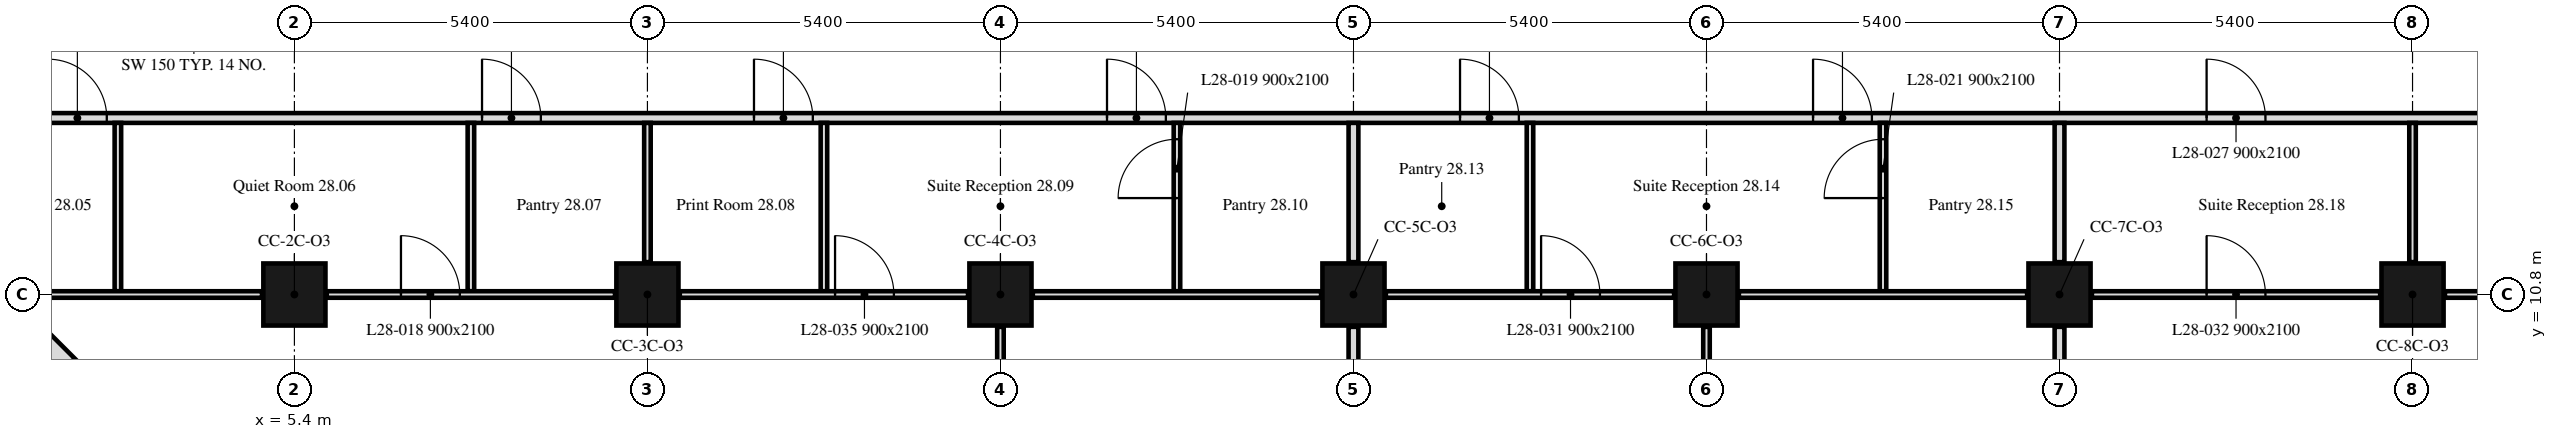
"""IFC4 building model, lengths in metres.
Left out: names, types, materials, properties, quantities, classifications, styles, units other than length and angle.
Written with IfcOpenShell. Run it as: python <this file> out.ifc"""

import sys

from ifc_helpers import new_model, si_unit, direction, frame, frame_2d, origin, origin_2d, place, context, subcontext, project, spatial, rectangle, extrude, element, fill, save


model = new_model("IFC4")
c1 = context("Model", 3, precision=1e-05, world=origin(), true_north=direction((0.0, 1.0)))
c2 = subcontext(c1, "Body", "Model", "MODEL_VIEW")
j1 = project(units=[si_unit("LENGTHUNIT", "METRE"), si_unit("PLANEANGLEUNIT", "RADIAN")], contexts=[c1])
p1 = place(None, origin())
s1 = spatial("IfcSite", under=j1, at=p1, CompositionType="ELEMENT")
p2 = place(p1, origin())
s2 = spatial("IfcBuilding", under=s1, at=p2, CompositionType="ELEMENT")
p3 = place(p2, frame((0.0, 0.0, 118.2)))
s3 = spatial("IfcBuildingStorey", under=s2, at=p3, CompositionType="ELEMENT", Elevation=118.2)
for number, where, z_axis, x_axis in (
    (1, (5.4, 10.8, 0.0), (0.0, 0.0, 1.0), (1.0, 0.0, 0.0)),
    (2, (10.8, 10.8, 0.0), (0.0, 0.0, 1.0), (1.0, 0.0, 0.0)),
    (3, (16.2, 10.8, 0.0), (0.0, 0.0, 1.0), (1.0, 0.0, 0.0)),
    (4, (21.6, 10.8, 0.0), (0.0, 0.0, 1.0), (1.0, 0.0, 0.0)),
    (5, (27.0, 10.8, 0.0), (0.0, 0.0, 1.0), (1.0, 0.0, 0.0)),
    (6, (32.4, 10.8, 0.0), (0.0, 0.0, 1.0), (1.0, 0.0, 0.0)),
    (7, (37.8, 10.8, 0.0), (0.0, 0.0, 1.0), (1.0, 0.0, 0.0)),
):
    element("IfcColumn", number, at=place(p3, frame(where, z_axis=z_axis, x_axis=x_axis)), inside=s3, PredefinedType="COLUMN", context=c2, shape_type="SweptSolid", body=[
        extrude(rectangle(XDim=0.95, YDim=0.95, at=origin_2d()), origin(), (0.0, 0.0, 1.0), 3.5),
    ])
p4 = place(p3, frame((37.65, 6.099, 0.0), z_axis=(0.0, 0.0, 1.0), x_axis=(0.707106781187, 0.707106781187, 0.0)))
e8 = element("IfcWall", 8, at=p4, inside=s3, PredefinedType="SOLIDWALL", context=c2, shape_type="SweptSolid", body=[
    extrude(rectangle(XDim=6.86, YDim=0.3, at=frame_2d((3.43, 0.0))), origin(), (0.0, 0.0, 1.0), 3.5),
])
p5 = place(p4, frame((1.73, 0.0, 0.9)))
e9 = element("IfcOpeningElement", 9, at=p5, cuts=e8, PredefinedType="OPENING", context=c2, shape_type="SweptSolid", body=[
    extrude(rectangle(XDim=3.4, YDim=1.7, at=frame_2d((1.7, 0.85))), frame((0.0, 0.16, 0.0), z_axis=(0.0, -1.0, 0.0), x_axis=(1.0, 0.0, 0.0)), (0.0, 0.0, 1.0), 0.32),
])
p6 = place(p3, frame((0.699, 10.949, 0.0), z_axis=(0.0, 0.0, 1.0), x_axis=(0.707106781187, -0.707106781187, 0.0)))
e10 = element("IfcWall", 10, at=p6, inside=s3, PredefinedType="SOLIDWALL", context=c2, shape_type="SweptSolid", body=[
    extrude(rectangle(XDim=6.86, YDim=0.3, at=frame_2d((3.43, 0.0))), origin(), (0.0, 0.0, 1.0), 3.5),
])
p7 = place(p6, frame((1.73, 0.0, 0.9)))
e11 = element("IfcOpeningElement", 11, at=p7, cuts=e10, PredefinedType="OPENING", context=c2, shape_type="SweptSolid", body=[
    extrude(rectangle(XDim=3.4, YDim=1.7, at=frame_2d((1.7, 0.85))), frame((0.0, 0.16, 0.0), z_axis=(0.0, -1.0, 0.0), x_axis=(1.0, 0.0, 0.0)), (0.0, 0.0, 1.0), 0.32),
])
p8 = place(p3, frame((0.751, 13.5, 0.0), z_axis=(0.0, 0.0, 1.0), x_axis=(1.0, 0.0, 0.0)))
e12 = element("IfcWall", 12, at=p8, inside=s3, PredefinedType="PARTITIONING", context=c2, shape_type="SweptSolid", body=[
    extrude(rectangle(XDim=41.698, YDim=0.15, at=frame_2d((20.849, 0.0))), origin(), (0.0, 0.0, 1.0), 3.5),
])
p9 = place(p8, frame((0.879, 0.0, 0.0)))
e13 = element("IfcOpeningElement", 13, at=p9, cuts=e12, PredefinedType="OPENING", context=c2, shape_type="SweptSolid", body=[
    extrude(rectangle(XDim=0.9, YDim=2.1, at=frame_2d((0.45, 1.05))), frame((0.0, 0.075, 0.0), z_axis=(0.0, -1.0, 0.0), x_axis=(1.0, 0.0, 0.0)), (0.0, 0.0, 1.0), 0.15),
])
p10 = place(p8, frame((7.519, 0.0, 0.0)))
e14 = element("IfcOpeningElement", 14, at=p10, cuts=e12, PredefinedType="OPENING", context=c2, shape_type="SweptSolid", body=[
    extrude(rectangle(XDim=0.9, YDim=2.1, at=frame_2d((0.45, 1.05))), frame((0.0, 0.075, 0.0), z_axis=(0.0, -1.0, 0.0), x_axis=(1.0, 0.0, 0.0)), (0.0, 0.0, 1.0), 0.15),
])
p11 = place(p8, frame((11.679, 0.0, 0.0)))
e15 = element("IfcOpeningElement", 15, at=p11, cuts=e12, PredefinedType="OPENING", context=c2, shape_type="SweptSolid", body=[
    extrude(rectangle(XDim=0.9, YDim=2.1, at=frame_2d((0.45, 1.05))), frame((0.0, 0.075, 0.0), z_axis=(0.0, -1.0, 0.0), x_axis=(1.0, 0.0, 0.0)), (0.0, 0.0, 1.0), 0.15),
])
p12 = place(p8, frame((22.479, 0.0, 0.0)))
e16 = element("IfcOpeningElement", 16, at=p12, cuts=e12, PredefinedType="OPENING", context=c2, shape_type="SweptSolid", body=[
    extrude(rectangle(XDim=0.9, YDim=2.1, at=frame_2d((0.45, 1.05))), frame((0.0, 0.075, 0.0), z_axis=(0.0, -1.0, 0.0), x_axis=(1.0, 0.0, 0.0)), (0.0, 0.0, 1.0), 0.15),
])
p13 = place(p8, frame((33.899, 0.0, 0.0)))
e17 = element("IfcOpeningElement", 17, at=p13, cuts=e12, PredefinedType="OPENING", context=c2, shape_type="SweptSolid", body=[
    extrude(rectangle(XDim=0.9, YDim=2.1, at=frame_2d((0.45, 1.05))), frame((0.0, 0.075, 0.0), z_axis=(0.0, -1.0, 0.0), x_axis=(1.0, 0.0, 0.0)), (0.0, 0.0, 1.0), 0.15),
])
p14 = place(p8, frame((17.079, 0.0, 0.0)))
e18 = element("IfcOpeningElement", 18, at=p14, cuts=e12, PredefinedType="OPENING", context=c2, shape_type="SweptSolid", body=[
    extrude(rectangle(XDim=0.9, YDim=2.1, at=frame_2d((0.45, 1.05))), frame((0.0, 0.075, 0.0), z_axis=(0.0, -1.0, 0.0), x_axis=(1.0, 0.0, 0.0)), (0.0, 0.0, 1.0), 0.15),
])
p15 = place(p8, frame((27.879, 0.0, 0.0)))
e19 = element("IfcOpeningElement", 19, at=p15, cuts=e12, PredefinedType="OPENING", context=c2, shape_type="SweptSolid", body=[
    extrude(rectangle(XDim=0.9, YDim=2.1, at=frame_2d((0.45, 1.05))), frame((0.0, 0.075, 0.0), z_axis=(0.0, -1.0, 0.0), x_axis=(1.0, 0.0, 0.0)), (0.0, 0.0, 1.0), 0.15),
])
p16 = place(p3, frame((2.7, 10.85, 0.0), z_axis=(0.0, 0.0, 1.0), x_axis=(0.0, 1.0, 0.0)))
e20 = element("IfcWall", 20, at=p16, inside=s3, PredefinedType="PARTITIONING", context=c2, shape_type="SweptSolid", body=[
    extrude(rectangle(XDim=2.575, YDim=0.1, at=frame_2d((1.288, 0.0))), origin(), (0.0, 0.0, 1.0), 3.5),
])
p17 = place(p3, frame((1.112, 10.8, 0.0), z_axis=(0.0, 0.0, 1.0), x_axis=(1.0, 0.0, 0.0)))
e21 = element("IfcWall", 21, at=p17, inside=s3, PredefinedType="PARTITIONING", context=c2, shape_type="SweptSolid", body=[
    extrude(rectangle(XDim=3.793, YDim=0.1, at=frame_2d((1.896, 0.0))), origin(), (0.0, 0.0, 1.0), 3.5),
])
p18 = place(p3, frame((8.1, 10.85, 0.0), z_axis=(0.0, 0.0, 1.0), x_axis=(0.0, 1.0, 0.0)))
e22 = element("IfcWall", 22, at=p18, inside=s3, PredefinedType="PARTITIONING", context=c2, shape_type="SweptSolid", body=[
    extrude(rectangle(XDim=2.575, YDim=0.1, at=frame_2d((1.288, 0.0))), origin(), (0.0, 0.0, 1.0), 3.5),
])
p19 = place(p3, frame((5.895, 10.8, 0.0), z_axis=(0.0, 0.0, 1.0), x_axis=(1.0, 0.0, 0.0)))
e23 = element("IfcWall", 23, at=p19, inside=s3, PredefinedType="PARTITIONING", context=c2, shape_type="SweptSolid", body=[
    extrude(rectangle(XDim=4.41, YDim=0.1, at=frame_2d((2.205, 0.0))), origin(), (0.0, 0.0, 1.0), 3.5),
])
p20 = place(p19, frame((1.135, 0.0, 0.0)))
e24 = element("IfcOpeningElement", 24, at=p20, cuts=e23, PredefinedType="OPENING", context=c2, shape_type="SweptSolid", body=[
    extrude(rectangle(XDim=0.9, YDim=2.1, at=frame_2d((0.45, 1.05))), frame((0.0, 0.05, 0.0), z_axis=(0.0, -1.0, 0.0), x_axis=(1.0, 0.0, 0.0)), (0.0, 0.0, 1.0), 0.1),
])
p21 = place(p3, frame((10.8, 11.295, 0.0), z_axis=(0.0, 0.0, 1.0), x_axis=(0.0, 1.0, 0.0)))
e25 = element("IfcWall", 25, at=p21, inside=s3, PredefinedType="PARTITIONING", context=c2, shape_type="SweptSolid", body=[
    extrude(rectangle(XDim=2.13, YDim=0.1, at=frame_2d((1.065, 0.0))), origin(), (0.0, 0.0, 1.0), 3.5),
])
p22 = place(p3, frame((13.5, 10.85, 0.0), z_axis=(0.0, 0.0, 1.0), x_axis=(0.0, 1.0, 0.0)))
e26 = element("IfcWall", 26, at=p22, inside=s3, PredefinedType="PARTITIONING", context=c2, shape_type="SweptSolid", body=[
    extrude(rectangle(XDim=2.575, YDim=0.1, at=frame_2d((1.288, 0.0))), origin(), (0.0, 0.0, 1.0), 3.5),
])
p23 = place(p3, frame((11.295, 10.8, 0.0), z_axis=(0.0, 0.0, 1.0), x_axis=(1.0, 0.0, 0.0)))
e27 = element("IfcWall", 27, at=p23, inside=s3, PredefinedType="PARTITIONING", context=c2, shape_type="SweptSolid", body=[
    extrude(rectangle(XDim=4.41, YDim=0.1, at=frame_2d((2.205, 0.0))), origin(), (0.0, 0.0, 1.0), 3.5),
])
p24 = place(p23, frame((2.375, 0.0, 0.0)))
e28 = element("IfcOpeningElement", 28, at=p24, cuts=e27, PredefinedType="OPENING", context=c2, shape_type="SweptSolid", body=[
    extrude(rectangle(XDim=0.9, YDim=2.1, at=frame_2d((0.45, 1.05))), frame((0.0, 0.05, 0.0), z_axis=(0.0, -1.0, 0.0), x_axis=(1.0, 0.0, 0.0)), (0.0, 0.0, 1.0), 0.1),
])
p25 = place(p3, frame((18.9, 10.85, 0.0), z_axis=(0.0, 0.0, 1.0), x_axis=(0.0, 1.0, 0.0)))
e29 = element("IfcWall", 29, at=p25, inside=s3, PredefinedType="PARTITIONING", context=c2, shape_type="SweptSolid", body=[
    extrude(rectangle(XDim=2.575, YDim=0.1, at=frame_2d((1.288, 0.0))), origin(), (0.0, 0.0, 1.0), 3.5),
])
p26 = place(p25, frame((1.425, 0.0, 0.0)))
e30 = element("IfcOpeningElement", 30, at=p26, cuts=e29, PredefinedType="OPENING", context=c2, shape_type="SweptSolid", body=[
    extrude(rectangle(XDim=0.9, YDim=2.1, at=frame_2d((0.45, 1.05))), frame((0.0, 0.05, 0.0), z_axis=(0.0, -1.0, 0.0), x_axis=(1.0, 0.0, 0.0)), (0.0, 0.0, 1.0), 0.1),
])
p27 = place(p3, frame((16.695, 10.8, 0.0), z_axis=(0.0, 0.0, 1.0), x_axis=(1.0, 0.0, 0.0)))
e31 = element("IfcWall", 31, at=p27, inside=s3, PredefinedType="PARTITIONING", context=c2, shape_type="SweptSolid", body=[
    extrude(rectangle(XDim=4.41, YDim=0.1, at=frame_2d((2.205, 0.0))), origin(), (0.0, 0.0, 1.0), 3.5),
])
p28 = place(p3, frame((21.6, 11.295, 0.0), z_axis=(0.0, 0.0, 1.0), x_axis=(0.0, 1.0, 0.0)))
e32 = element("IfcWall", 32, at=p28, inside=s3, PredefinedType="PARTITIONING", context=c2, shape_type="SweptSolid", body=[
    extrude(rectangle(XDim=2.13, YDim=0.15, at=frame_2d((1.065, 0.0))), origin(), (0.0, 0.0, 1.0), 3.5),
])
p29 = place(p3, frame((16.2, 6.151, 0.0), z_axis=(0.0, 0.0, 1.0), x_axis=(0.0, 1.0, 0.0)))
e33 = element("IfcWall", 33, at=p29, inside=s3, PredefinedType="PARTITIONING", context=c2, shape_type="SweptSolid", body=[
    extrude(rectangle(XDim=4.154, YDim=0.1, at=frame_2d((2.077, 0.0))), origin(), (0.0, 0.0, 1.0), 3.5),
])
p30 = place(p29, frame((1.724, 0.0, 0.0)))
e34 = element("IfcOpeningElement", 34, at=p30, cuts=e33, PredefinedType="OPENING", context=c2, shape_type="SweptSolid", body=[
    extrude(rectangle(XDim=0.9, YDim=2.1, at=frame_2d((0.45, 1.05))), frame((0.0, 0.05, 0.0), z_axis=(0.0, -1.0, 0.0), x_axis=(1.0, 0.0, 0.0)), (0.0, 0.0, 1.0), 0.1),
])
p31 = place(p3, frame((21.6, 6.151, 0.0), z_axis=(0.0, 0.0, 1.0), x_axis=(0.0, 1.0, 0.0)))
e35 = element("IfcWall", 35, at=p31, inside=s3, PredefinedType="PARTITIONING", context=c2, shape_type="SweptSolid", body=[
    extrude(rectangle(XDim=4.154, YDim=0.15, at=frame_2d((2.077, 0.0))), origin(), (0.0, 0.0, 1.0), 3.5),
])
p32 = place(p3, frame((24.3, 10.85, 0.0), z_axis=(0.0, 0.0, 1.0), x_axis=(0.0, 1.0, 0.0)))
e36 = element("IfcWall", 36, at=p32, inside=s3, PredefinedType="PARTITIONING", context=c2, shape_type="SweptSolid", body=[
    extrude(rectangle(XDim=2.575, YDim=0.1, at=frame_2d((1.288, 0.0))), origin(), (0.0, 0.0, 1.0), 3.5),
])
p33 = place(p3, frame((22.095, 10.8, 0.0), z_axis=(0.0, 0.0, 1.0), x_axis=(1.0, 0.0, 0.0)))
e37 = element("IfcWall", 37, at=p33, inside=s3, PredefinedType="PARTITIONING", context=c2, shape_type="SweptSolid", body=[
    extrude(rectangle(XDim=4.41, YDim=0.1, at=frame_2d((2.205, 0.0))), origin(), (0.0, 0.0, 1.0), 3.5),
])
p34 = place(p33, frame((2.375, 0.0, 0.0)))
e38 = element("IfcOpeningElement", 38, at=p34, cuts=e37, PredefinedType="OPENING", context=c2, shape_type="SweptSolid", body=[
    extrude(rectangle(XDim=0.9, YDim=2.1, at=frame_2d((0.45, 1.05))), frame((0.0, 0.05, 0.0), z_axis=(0.0, -1.0, 0.0), x_axis=(1.0, 0.0, 0.0)), (0.0, 0.0, 1.0), 0.1),
])
p35 = place(p3, frame((29.7, 10.85, 0.0), z_axis=(0.0, 0.0, 1.0), x_axis=(0.0, 1.0, 0.0)))
e39 = element("IfcWall", 39, at=p35, inside=s3, PredefinedType="PARTITIONING", context=c2, shape_type="SweptSolid", body=[
    extrude(rectangle(XDim=2.575, YDim=0.1, at=frame_2d((1.288, 0.0))), origin(), (0.0, 0.0, 1.0), 3.5),
])
p36 = place(p35, frame((1.425, 0.0, 0.0)))
e40 = element("IfcOpeningElement", 40, at=p36, cuts=e39, PredefinedType="OPENING", context=c2, shape_type="SweptSolid", body=[
    extrude(rectangle(XDim=0.9, YDim=2.1, at=frame_2d((0.45, 1.05))), frame((0.0, 0.05, 0.0), z_axis=(0.0, -1.0, 0.0), x_axis=(1.0, 0.0, 0.0)), (0.0, 0.0, 1.0), 0.1),
])
p37 = place(p3, frame((27.495, 10.8, 0.0), z_axis=(0.0, 0.0, 1.0), x_axis=(1.0, 0.0, 0.0)))
e41 = element("IfcWall", 41, at=p37, inside=s3, PredefinedType="PARTITIONING", context=c2, shape_type="SweptSolid", body=[
    extrude(rectangle(XDim=4.41, YDim=0.1, at=frame_2d((2.205, 0.0))), origin(), (0.0, 0.0, 1.0), 3.5),
])
p38 = place(p3, frame((32.4, 11.295, 0.0), z_axis=(0.0, 0.0, 1.0), x_axis=(0.0, 1.0, 0.0)))
e42 = element("IfcWall", 42, at=p38, inside=s3, PredefinedType="PARTITIONING", context=c2, shape_type="SweptSolid", body=[
    extrude(rectangle(XDim=2.13, YDim=0.15, at=frame_2d((1.065, 0.0))), origin(), (0.0, 0.0, 1.0), 3.5),
])
p39 = place(p3, frame((27.0, 6.151, 0.0), z_axis=(0.0, 0.0, 1.0), x_axis=(0.0, 1.0, 0.0)))
e43 = element("IfcWall", 43, at=p39, inside=s3, PredefinedType="PARTITIONING", context=c2, shape_type="SweptSolid", body=[
    extrude(rectangle(XDim=4.154, YDim=0.1, at=frame_2d((2.077, 0.0))), origin(), (0.0, 0.0, 1.0), 3.5),
])
p40 = place(p39, frame((1.724, 0.0, 0.0)))
e44 = element("IfcOpeningElement", 44, at=p40, cuts=e43, PredefinedType="OPENING", context=c2, shape_type="SweptSolid", body=[
    extrude(rectangle(XDim=0.9, YDim=2.1, at=frame_2d((0.45, 1.05))), frame((0.0, 0.05, 0.0), z_axis=(0.0, -1.0, 0.0), x_axis=(1.0, 0.0, 0.0)), (0.0, 0.0, 1.0), 0.1),
])
p41 = place(p3, frame((32.4, 6.151, 0.0), z_axis=(0.0, 0.0, 1.0), x_axis=(0.0, 1.0, 0.0)))
e45 = element("IfcWall", 45, at=p41, inside=s3, PredefinedType="PARTITIONING", context=c2, shape_type="SweptSolid", body=[
    extrude(rectangle(XDim=4.154, YDim=0.15, at=frame_2d((2.077, 0.0))), origin(), (0.0, 0.0, 1.0), 3.5),
])
p42 = place(p3, frame((32.895, 10.8, 0.0), z_axis=(0.0, 0.0, 1.0), x_axis=(1.0, 0.0, 0.0)))
e46 = element("IfcWall", 46, at=p42, inside=s3, PredefinedType="PARTITIONING", context=c2, shape_type="SweptSolid", body=[
    extrude(rectangle(XDim=4.41, YDim=0.1, at=frame_2d((2.205, 0.0))), origin(), (0.0, 0.0, 1.0), 3.5),
])
p43 = place(p42, frame((1.755, 0.0, 0.0)))
e47 = element("IfcOpeningElement", 47, at=p43, cuts=e46, PredefinedType="OPENING", context=c2, shape_type="SweptSolid", body=[
    extrude(rectangle(XDim=0.9, YDim=2.1, at=frame_2d((0.45, 1.05))), frame((0.0, 0.05, 0.0), z_axis=(0.0, -1.0, 0.0), x_axis=(1.0, 0.0, 0.0)), (0.0, 0.0, 1.0), 0.1),
])
p44 = place(p3, frame((37.8, 11.295, 0.0), z_axis=(0.0, 0.0, 1.0), x_axis=(0.0, 1.0, 0.0)))
e48 = element("IfcWall", 48, at=p44, inside=s3, PredefinedType="PARTITIONING", context=c2, shape_type="SweptSolid", body=[
    extrude(rectangle(XDim=2.13, YDim=0.1, at=frame_2d((1.065, 0.0))), origin(), (0.0, 0.0, 1.0), 3.5),
])
p45 = place(p3, frame((38.295, 10.8, 0.0), z_axis=(0.0, 0.0, 1.0), x_axis=(1.0, 0.0, 0.0)))
e49 = element("IfcWall", 49, at=p45, inside=s3, PredefinedType="PARTITIONING", context=c2, shape_type="SweptSolid", body=[
    extrude(rectangle(XDim=3.793, YDim=0.1, at=frame_2d((1.896, 0.0))), origin(), (0.0, 0.0, 1.0), 3.5),
])
p46 = place(p45, frame((1.08, 0.0, 0.0)))
e50 = element("IfcOpeningElement", 50, at=p46, cuts=e49, PredefinedType="OPENING", context=c2, shape_type="SweptSolid", body=[
    extrude(rectangle(XDim=0.9, YDim=2.1, at=frame_2d((0.45, 1.05))), frame((0.0, 0.05, 0.0), z_axis=(0.0, -1.0, 0.0), x_axis=(1.0, 0.0, 0.0)), (0.0, 0.0, 1.0), 0.1),
])
p47 = place(p9, origin())
e51 = element("IfcDoor", 51, at=p47, inside=s3, OperationType="SINGLE_SWING_LEFT", PredefinedType="DOOR", context=c2, shape_type="SweptSolid", body=[
    extrude(rectangle(XDim=0.9, YDim=2.1, at=frame_2d((0.45, 1.05))), frame((0.0, 0.025, 0.0), z_axis=(0.0, -1.0, 0.0), x_axis=(1.0, 0.0, 0.0)), (0.0, 0.0, 1.0), 0.05),
])
fill(e13, e51)
p48 = place(p10, origin())
e52 = element("IfcDoor", 52, at=p48, inside=s3, OperationType="SINGLE_SWING_LEFT", PredefinedType="DOOR", context=c2, shape_type="SweptSolid", body=[
    extrude(rectangle(XDim=0.9, YDim=2.1, at=frame_2d((0.45, 1.05))), frame((0.0, 0.025, 0.0), z_axis=(0.0, -1.0, 0.0), x_axis=(1.0, 0.0, 0.0)), (0.0, 0.0, 1.0), 0.05),
])
fill(e14, e52)
p49 = place(p11, origin())
e53 = element("IfcDoor", 53, at=p49, inside=s3, OperationType="SINGLE_SWING_LEFT", PredefinedType="DOOR", context=c2, shape_type="SweptSolid", body=[
    extrude(rectangle(XDim=0.9, YDim=2.1, at=frame_2d((0.45, 1.05))), frame((0.0, 0.025, 0.0), z_axis=(0.0, -1.0, 0.0), x_axis=(1.0, 0.0, 0.0)), (0.0, 0.0, 1.0), 0.05),
])
fill(e15, e53)
p50 = place(p12, origin())
e54 = element("IfcDoor", 54, at=p50, inside=s3, OperationType="SINGLE_SWING_LEFT", PredefinedType="DOOR", context=c2, shape_type="SweptSolid", body=[
    extrude(rectangle(XDim=0.9, YDim=2.1, at=frame_2d((0.45, 1.05))), frame((0.0, 0.025, 0.0), z_axis=(0.0, -1.0, 0.0), x_axis=(1.0, 0.0, 0.0)), (0.0, 0.0, 1.0), 0.05),
])
fill(e16, e54)
p51 = place(p20, origin())
e55 = element("IfcDoor", 55, at=p51, inside=s3, OperationType="SINGLE_SWING_LEFT", PredefinedType="DOOR", context=c2, shape_type="SweptSolid", body=[
    extrude(rectangle(XDim=0.9, YDim=2.1, at=frame_2d((0.45, 1.05))), frame((0.0, 0.025, 0.0), z_axis=(0.0, -1.0, 0.0), x_axis=(1.0, 0.0, 0.0)), (0.0, 0.0, 1.0), 0.05),
])
fill(e24, e55)
p52 = place(p26, origin())
e56 = element("IfcDoor", 56, at=p52, inside=s3, OperationType="SINGLE_SWING_LEFT", PredefinedType="DOOR", context=c2, shape_type="SweptSolid", body=[
    extrude(rectangle(XDim=0.9, YDim=2.1, at=frame_2d((0.45, 1.05))), frame((0.0, 0.025, 0.0), z_axis=(0.0, -1.0, 0.0), x_axis=(1.0, 0.0, 0.0)), (0.0, 0.0, 1.0), 0.05),
])
fill(e30, e56)
p53 = place(p36, origin())
e57 = element("IfcDoor", 57, at=p53, inside=s3, OperationType="SINGLE_SWING_RIGHT", PredefinedType="DOOR", context=c2, shape_type="SweptSolid", body=[
    extrude(rectangle(XDim=0.9, YDim=2.1, at=frame_2d((0.45, 1.05))), frame((0.0, 0.025, 0.0), z_axis=(0.0, -1.0, 0.0), x_axis=(1.0, 0.0, 0.0)), (0.0, 0.0, 1.0), 0.05),
])
fill(e40, e57)
p54 = place(p13, origin())
e58 = element("IfcDoor", 58, at=p54, inside=s3, OperationType="SINGLE_SWING_LEFT", PredefinedType="DOOR", context=c2, shape_type="SweptSolid", body=[
    extrude(rectangle(XDim=0.9, YDim=2.1, at=frame_2d((0.45, 1.05))), frame((0.0, 0.025, 0.0), z_axis=(0.0, -1.0, 0.0), x_axis=(1.0, 0.0, 0.0)), (0.0, 0.0, 1.0), 0.05),
])
fill(e17, e58)
p55 = place(p34, origin())
e59 = element("IfcDoor", 59, at=p55, inside=s3, OperationType="SINGLE_SWING_LEFT", PredefinedType="DOOR", context=c2, shape_type="SweptSolid", body=[
    extrude(rectangle(XDim=0.9, YDim=2.1, at=frame_2d((0.45, 1.05))), frame((0.0, 0.025, 0.0), z_axis=(0.0, -1.0, 0.0), x_axis=(1.0, 0.0, 0.0)), (0.0, 0.0, 1.0), 0.05),
])
fill(e38, e59)
p56 = place(p43, origin())
e60 = element("IfcDoor", 60, at=p56, inside=s3, OperationType="SINGLE_SWING_LEFT", PredefinedType="DOOR", context=c2, shape_type="SweptSolid", body=[
    extrude(rectangle(XDim=0.9, YDim=2.1, at=frame_2d((0.45, 1.05))), frame((0.0, 0.025, 0.0), z_axis=(0.0, -1.0, 0.0), x_axis=(1.0, 0.0, 0.0)), (0.0, 0.0, 1.0), 0.05),
])
fill(e47, e60)
p57 = place(p14, origin())
e61 = element("IfcDoor", 61, at=p57, inside=s3, OperationType="SINGLE_SWING_RIGHT", PredefinedType="DOOR", context=c2, shape_type="SweptSolid", body=[
    extrude(rectangle(XDim=0.9, YDim=2.1, at=frame_2d((0.45, 1.05))), frame((0.0, 0.025, 0.0), z_axis=(0.0, -1.0, 0.0), x_axis=(1.0, 0.0, 0.0)), (0.0, 0.0, 1.0), 0.05),
])
fill(e18, e61)
p58 = place(p15, origin())
e62 = element("IfcDoor", 62, at=p58, inside=s3, OperationType="SINGLE_SWING_LEFT", PredefinedType="DOOR", context=c2, shape_type="SweptSolid", body=[
    extrude(rectangle(XDim=0.9, YDim=2.1, at=frame_2d((0.45, 1.05))), frame((0.0, 0.025, 0.0), z_axis=(0.0, -1.0, 0.0), x_axis=(1.0, 0.0, 0.0)), (0.0, 0.0, 1.0), 0.05),
])
fill(e19, e62)
p59 = place(p24, origin())
e63 = element("IfcDoor", 63, at=p59, inside=s3, OperationType="SINGLE_SWING_LEFT", PredefinedType="DOOR", context=c2, shape_type="SweptSolid", body=[
    extrude(rectangle(XDim=0.9, YDim=2.1, at=frame_2d((0.45, 1.05))), frame((0.0, 0.025, 0.0), z_axis=(0.0, -1.0, 0.0), x_axis=(1.0, 0.0, 0.0)), (0.0, 0.0, 1.0), 0.05),
])
fill(e28, e63)
save(model, sys.argv[1])
